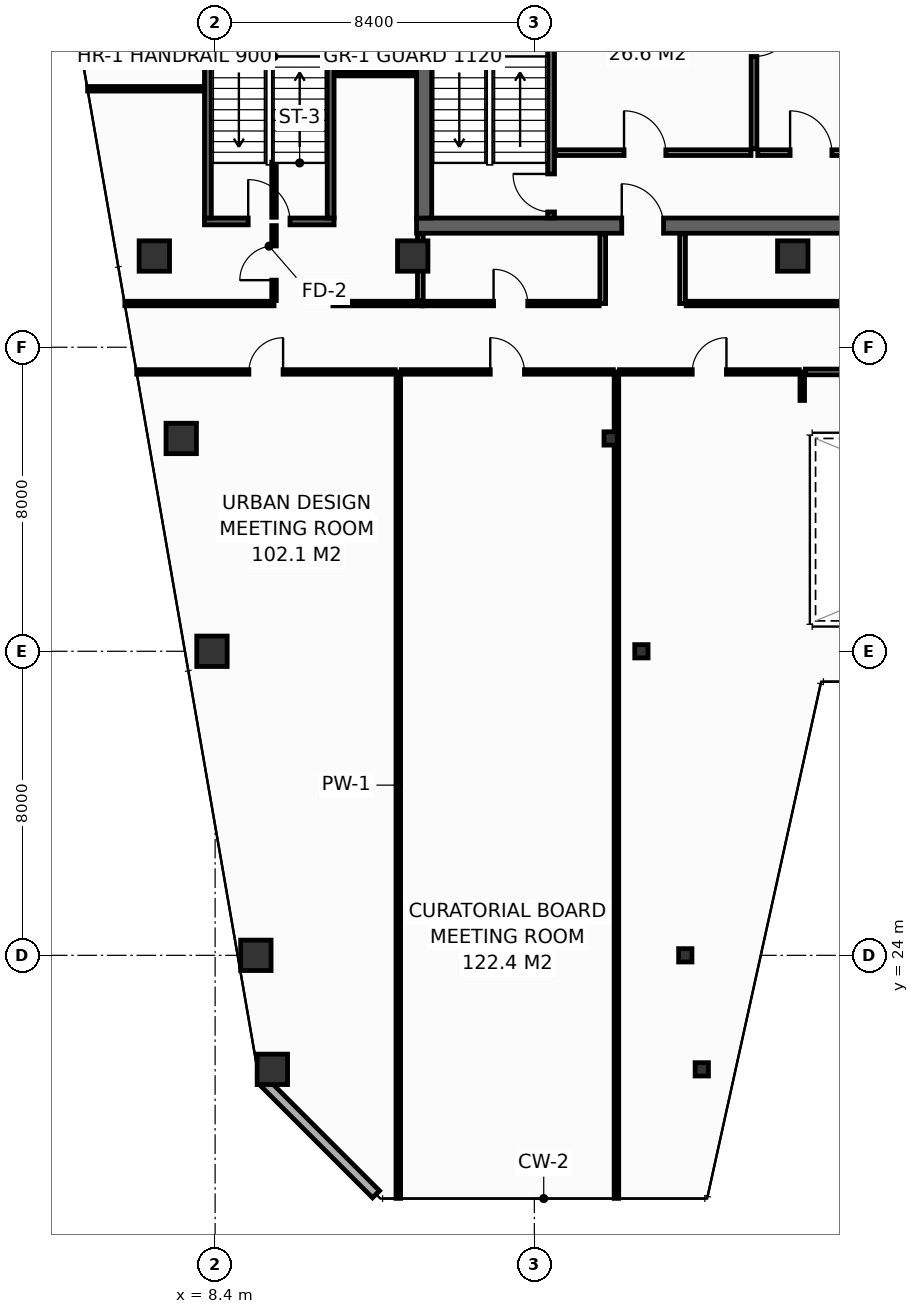
"""IFC4 building model, lengths in metres.
Left out: names, types, materials, properties, quantities, classifications, styles, units other than length and angle.
Written with IfcOpenShell. Run it as: python <this file> out.ifc"""

import sys

from ifc_helpers import new_model, si_unit, direction, frame, frame_2d, origin, origin_2d, place, context, subcontext, project, spatial, rectangle, hollow_rectangle, extrude, element, fill, save


model = new_model("IFC4")
c1 = context("Model", 3, precision=1e-05, world=origin(), true_north=direction((0.0, 1.0)))
c2 = subcontext(c1, "Body", "Model", "MODEL_VIEW")
j1 = project(units=[si_unit("LENGTHUNIT", "METRE"), si_unit("PLANEANGLEUNIT", "RADIAN")], contexts=[c1])
p1 = place(None, origin())
s1 = spatial("IfcSite", under=j1, at=p1, CompositionType="ELEMENT")
p2 = place(p1, origin())
s2 = spatial("IfcBuilding", under=s1, at=p2, CompositionType="ELEMENT")
p3 = place(p2, frame((0.0, 0.0, 242.0)))
s3 = spatial("IfcBuildingStorey", under=s2, at=p3, CompositionType="ELEMENT", Elevation=242.0)
p4 = place(p3, frame((13.7, 43.2, 0.0), z_axis=(0.0, 0.0, 1.0), x_axis=(1.0, 0.0, 0.0)))
e1 = element("IfcWall", 1, at=p4, inside=s3, PredefinedType="SHEAR", context=c2, shape_type="SweptSolid", body=[
    extrude(rectangle(XDim=32.5, YDim=0.4, at=frame_2d((16.25, 0.0))), origin(), (0.0, 0.0, 1.0), 3.55),
])
p5 = place(p4, frame((5.4, 0.0, 0.0)))
e2 = element("IfcOpeningElement", 2, at=p5, cuts=e1, PredefinedType="OPENING", context=c2, shape_type="SweptSolid", body=[
    extrude(rectangle(XDim=1.1, YDim=2.15, at=frame_2d((0.55, 1.075))), frame((0.0, 0.21, 0.0), z_axis=(0.0, -1.0, 0.0), x_axis=(1.0, 0.0, 0.0)), (0.0, 0.0, 1.0), 0.42),
])
p6 = place(p4, frame((25.6, 0.0, 0.0)))
e3 = element("IfcOpeningElement", 3, at=p6, cuts=e1, PredefinedType="OPENING", context=c2, shape_type="SweptSolid", body=[
    extrude(rectangle(XDim=1.1, YDim=2.15, at=frame_2d((0.55, 1.075))), frame((0.0, 0.21, 0.0), z_axis=(0.0, -1.0, 0.0), x_axis=(1.0, 0.0, 0.0)), (0.0, 0.0, 1.0), 0.42),
])
p7 = place(p3, frame((13.9, 43.4, 0.0), z_axis=(0.0, 0.0, 1.0), x_axis=(0.0, 1.0, 0.0)))
e4 = element("IfcWall", 4, at=p7, inside=s3, PredefinedType="SHEAR", context=c2, shape_type="SweptSolid", body=[
    extrude(rectangle(XDim=10.4, YDim=0.4, at=frame_2d((5.2, 0.0))), origin(), (0.0, 0.0, 1.0), 3.55),
])
for number, where, z_axis, x_axis in (
    (5, (6.8, 42.4, 0.0), (0.0, 0.0, 1.0), (1.0, 0.0, 0.0)),
    (6, (13.6, 42.4, 0.0), (0.0, 0.0, 1.0), (1.0, 0.0, 0.0)),
    (7, (23.6, 42.4, 0.0), (0.0, 0.0, 1.0), (1.0, 0.0, 0.0)),
    (8, (9.906, 21.0, 0.0), (0.0, 0.0, 1.0), (1.0, 0.0, 0.0)),
):
    element("IfcColumn", number, at=place(p3, frame(where, z_axis=z_axis, x_axis=x_axis)), inside=s3, PredefinedType="COLUMN", context=c2, shape_type="SweptSolid", body=[
        extrude(hollow_rectangle(XDim=0.8, YDim=0.8, WallThickness=0.036, at=origin_2d()), origin(), (0.0, 0.0, 1.0), 3.8),
    ])
p8 = place(p3, frame((21.206, 21.0, 0.0), z_axis=(0.0, 0.0, 1.0), x_axis=(1.0, 0.0, 0.0)))
e9 = element("IfcColumn", 9, at=p8, inside=s3, PredefinedType="COLUMN", context=c2, shape_type="SweptSolid", body=[
    extrude(hollow_rectangle(XDim=0.35, YDim=0.35, WallThickness=0.016, at=origin_2d()), origin(), (0.0, 0.0, 1.0), 3.8),
])
p9 = place(p3, frame((9.472, 24.0, 0.0), z_axis=(0.0, 0.0, 1.0), x_axis=(1.0, 0.0, 0.0)))
e10 = element("IfcColumn", 10, at=p9, inside=s3, PredefinedType="COLUMN", context=c2, shape_type="SweptSolid", body=[
    extrude(hollow_rectangle(XDim=0.8, YDim=0.8, WallThickness=0.036, at=origin_2d()), origin(), (0.0, 0.0, 1.0), 3.8),
])
p10 = place(p3, frame((20.772, 24.0, 0.0), z_axis=(0.0, 0.0, 1.0), x_axis=(1.0, 0.0, 0.0)))
e11 = element("IfcColumn", 11, at=p10, inside=s3, PredefinedType="COLUMN", context=c2, shape_type="SweptSolid", body=[
    extrude(hollow_rectangle(XDim=0.35, YDim=0.35, WallThickness=0.016, at=origin_2d()), origin(), (0.0, 0.0, 1.0), 3.8),
])
p11 = place(p3, frame((8.317, 32.0, 0.0), z_axis=(0.0, 0.0, 1.0), x_axis=(1.0, 0.0, 0.0)))
e12 = element("IfcColumn", 12, at=p11, inside=s3, PredefinedType="COLUMN", context=c2, shape_type="SweptSolid", body=[
    extrude(hollow_rectangle(XDim=0.8, YDim=0.8, WallThickness=0.036, at=origin_2d()), origin(), (0.0, 0.0, 1.0), 3.8),
])
p12 = place(p3, frame((19.617, 32.0, 0.0), z_axis=(0.0, 0.0, 1.0), x_axis=(1.0, 0.0, 0.0)))
e13 = element("IfcColumn", 13, at=p12, inside=s3, PredefinedType="COLUMN", context=c2, shape_type="SweptSolid", body=[
    extrude(hollow_rectangle(XDim=0.35, YDim=0.35, WallThickness=0.016, at=origin_2d()), origin(), (0.0, 0.0, 1.0), 3.8),
])
p13 = place(p3, frame((7.508, 37.6, 0.0), z_axis=(0.0, 0.0, 1.0), x_axis=(1.0, 0.0, 0.0)))
e14 = element("IfcColumn", 14, at=p13, inside=s3, PredefinedType="COLUMN", context=c2, shape_type="SweptSolid", body=[
    extrude(hollow_rectangle(XDim=0.8, YDim=0.8, WallThickness=0.036, at=origin_2d()), origin(), (0.0, 0.0, 1.0), 3.8),
])
p14 = place(p3, frame((18.808, 37.6, 0.0), z_axis=(0.0, 0.0, 1.0), x_axis=(1.0, 0.0, 0.0)))
e15 = element("IfcColumn", 15, at=p14, inside=s3, PredefinedType="COLUMN", context=c2, shape_type="SweptSolid", body=[
    extrude(hollow_rectangle(XDim=0.35, YDim=0.35, WallThickness=0.016, at=origin_2d()), origin(), (0.0, 0.0, 1.0), 3.8),
])
p15 = place(p3, frame((17.24, 43.4, 0.0), z_axis=(0.0, 0.0, 1.0), x_axis=(0.0, 1.0, 0.0)))
e16 = element("IfcWall", 16, at=p15, inside=s3, PredefinedType="SHEAR", context=c2, shape_type="SweptSolid", body=[
    extrude(rectangle(XDim=10.4, YDim=0.18, at=frame_2d((5.2, 0.0))), origin(), (0.0, 0.0, 1.0), 3.55),
])
p16 = place(p15, frame((0.16, 0.0, 0.0)))
e17 = element("IfcOpeningElement", 17, at=p16, cuts=e16, PredefinedType="OPENING", context=c2, shape_type="SweptSolid", body=[
    extrude(rectangle(XDim=1.0, YDim=2.15, at=frame_2d((0.5, 1.075))), frame((0.0, 0.1, 0.0), z_axis=(0.0, -1.0, 0.0), x_axis=(1.0, 0.0, 0.0)), (0.0, 0.0, 1.0), 0.2),
])
p17 = place(p3, frame((8.12, 43.31, 0.0), z_axis=(0.0, 0.0, 1.0), x_axis=(1.0, 0.0, 0.0)))
e18 = element("IfcWall", 18, at=p17, inside=s3, PredefinedType="SHEAR", context=c2, shape_type="SweptSolid", body=[
    extrude(rectangle(XDim=3.41, YDim=0.18, at=frame_2d((1.705, 0.0))), origin(), (0.0, 0.0, 1.0), 3.55),
])
p18 = place(p17, frame((1.15, 0.0, 0.0)))
e19 = element("IfcOpeningElement", 19, at=p18, cuts=e18, PredefinedType="OPENING", context=c2, shape_type="SweptSolid", body=[
    extrude(rectangle(XDim=1.1, YDim=2.15, at=frame_2d((0.55, 1.075))), frame((0.0, 0.1, 0.0), z_axis=(0.0, -1.0, 0.0), x_axis=(1.0, 0.0, 0.0)), (0.0, 0.0, 1.0), 0.2),
])
for number, where, z_axis, x_axis in (
    (20, (11.44, 43.4, 0.0), (0.0, 0.0, 1.0), (0.0, 1.0, 0.0)),
    (21, (8.21, 53.8, 0.0), (0.0, 0.0, 1.0), (0.0, -1.0, 0.0)),
):
    element("IfcWall", number, at=place(p3, frame(where, z_axis=z_axis, x_axis=x_axis)), inside=s3, PredefinedType="SHEAR", context=c2, shape_type="SweptSolid", body=[
        extrude(rectangle(XDim=10.4, YDim=0.18, at=frame_2d((5.2, 0.0))), origin(), (0.0, 0.0, 1.0), 3.55),
    ])
p19 = place(p3, frame((17.36, 45.12, 0.0), z_axis=(0.0, 0.0, 1.0), x_axis=(1.0, 0.0, 0.0)))
e22 = element("IfcWall", 22, at=p19, inside=s3, PredefinedType="PARTITIONING", context=c2, shape_type="SweptSolid", body=[
    extrude(rectangle(XDim=5.14, YDim=0.15, at=frame_2d((2.57, 0.0))), origin(), (0.0, 0.0, 1.0), 3.55),
])
p20 = place(p19, frame((1.8, 0.0, 0.0)))
e23 = element("IfcOpeningElement", 23, at=p20, cuts=e22, PredefinedType="OPENING", context=c2, shape_type="SweptSolid", body=[
    extrude(rectangle(XDim=1.1, YDim=2.15, at=frame_2d((0.55, 1.075))), frame((0.0, 0.085, 0.0), z_axis=(0.0, -1.0, 0.0), x_axis=(1.0, 0.0, 0.0)), (0.0, 0.0, 1.0), 0.17),
])
p21 = place(p3, frame((22.58, 50.55, 0.0), z_axis=(0.0, 0.0, 1.0), x_axis=(0.0, -1.0, 0.0)))
e24 = element("IfcWall", 24, at=p21, inside=s3, PredefinedType="PARTITIONING", context=c2, shape_type="SweptSolid", body=[
    extrude(rectangle(XDim=5.33, YDim=0.15, at=frame_2d((2.665, 0.0))), origin(), (0.0, 0.0, 1.0), 3.55),
])
p22 = place(p21, frame((1.8, 0.0, 0.0)))
e25 = element("IfcOpeningElement", 25, at=p22, cuts=e24, PredefinedType="OPENING", context=c2, shape_type="SweptSolid", body=[
    extrude(rectangle(XDim=1.1, YDim=2.15, at=frame_2d((0.55, 1.075))), frame((0.0, 0.085, 0.0), z_axis=(0.0, -1.0, 0.0), x_axis=(1.0, 0.0, 0.0)), (0.0, 0.0, 1.0), 0.17),
])
p23 = place(p3, frame((22.68, 45.12, 0.0), z_axis=(0.0, 0.0, 1.0), x_axis=(1.0, 0.0, 0.0)))
e26 = element("IfcWall", 26, at=p23, inside=s3, PredefinedType="PARTITIONING", context=c2, shape_type="SweptSolid", body=[
    extrude(rectangle(XDim=2.92, YDim=0.15, at=frame_2d((1.46, 0.0))), origin(), (0.0, 0.0, 1.0), 3.55),
])
p24 = place(p23, frame((0.85, 0.0, 0.0)))
e27 = element("IfcOpeningElement", 27, at=p24, cuts=e26, PredefinedType="OPENING", context=c2, shape_type="SweptSolid", body=[
    extrude(rectangle(XDim=1.1, YDim=2.15, at=frame_2d((0.55, 1.075))), frame((0.0, 0.085, 0.0), z_axis=(0.0, -1.0, 0.0), x_axis=(1.0, 0.0, 0.0)), (0.0, 0.0, 1.0), 0.17),
])
p25 = place(p3, frame((9.66, 20.687, 0.0), z_axis=(0.0, 0.0, 1.0), x_axis=(0.70707775441, -0.707135806771, 0.0)))
e28 = element("IfcWall", 28, at=p25, inside=s3, PredefinedType="STANDARD", context=c2, shape_type="SweptSolid", body=[
    extrude(rectangle(XDim=4.206, YDim=0.26, at=frame_2d((2.103, 0.0))), origin(), (0.0, 0.0, 1.0), 3.55),
])
p26 = place(p3, frame((6.024, 41.15, 0.0), z_axis=(0.0, 0.0, 1.0), x_axis=(1.0, 0.0, 0.0)))
e29 = element("IfcWall", 29, at=p26, inside=s3, PredefinedType="PARTITIONING", context=c2, shape_type="SweptSolid", body=[
    extrude(rectangle(XDim=3.926, YDim=0.12, at=frame_2d((1.963, 0.0))), origin(), (0.0, 0.0, 1.0), 3.085),
])
p27 = place(p3, frame((11.5, 41.15, 0.0), z_axis=(0.0, 0.0, 1.0), x_axis=(1.0, 0.0, 0.0)))
e30 = element("IfcWall", 30, at=p27, inside=s3, PredefinedType="PARTITIONING", context=c2, shape_type="SweptSolid", body=[
    extrude(rectangle(XDim=2.35, YDim=0.12, at=frame_2d((1.175, 0.0))), origin(), (0.0, 0.0, 1.0), 3.55),
])
p28 = place(p3, frame((5.045, 46.8, 0.0), z_axis=(0.0, 0.0, 1.0), x_axis=(1.0, 0.0, 0.0)))
e31 = element("IfcWall", 31, at=p28, inside=s3, PredefinedType="PARTITIONING", context=c2, shape_type="SweptSolid", body=[
    extrude(rectangle(XDim=3.055, YDim=0.12, at=frame_2d((1.527, 0.0))), origin(), (0.0, 0.0, 1.0), 2.947),
])
p29 = place(p3, frame((9.95, 41.23, 0.0), z_axis=(0.0, 0.0, 1.0), x_axis=(0.0, 1.0, 0.0)))
e32 = element("IfcWall", 32, at=p29, inside=s3, PredefinedType="PARTITIONING", context=c2, shape_type="SweptSolid", body=[
    extrude(rectangle(XDim=1.97, YDim=0.12, at=frame_2d((0.985, 0.0))), origin(), (0.0, 0.0, 1.0), 2.947),
])
p30 = place(p29, frame((0.535, 0.0, 0.0)))
e33 = element("IfcOpeningElement", 33, at=p30, cuts=e32, PredefinedType="OPENING", context=c2, shape_type="SweptSolid", body=[
    extrude(rectangle(XDim=0.9, YDim=2.1, at=frame_2d((0.45, 1.05))), frame((0.0, 0.07, 0.0), z_axis=(0.0, -1.0, 0.0), x_axis=(1.0, 0.0, 0.0)), (0.0, 0.0, 1.0), 0.14),
])
p31 = place(p3, frame((9.95, 43.42, 0.0), z_axis=(0.0, 0.0, 1.0), x_axis=(0.0, 1.0, 0.0)))
e34 = element("IfcWall", 34, at=p31, inside=s3, PredefinedType="PARTITIONING", context=c2, shape_type="SweptSolid", body=[
    extrude(rectangle(XDim=1.45, YDim=0.12, at=frame_2d((0.725, 0.0))), origin(), (0.0, 0.0, 1.0), 3.55),
])
p32 = place(p3, frame((11.55, 47.2, 0.0), z_axis=(0.0, 0.0, 1.0), x_axis=(1.0, 0.0, 0.0)))
e35 = element("IfcWall", 35, at=p32, inside=s3, PredefinedType="PARTITIONING", context=c2, shape_type="SweptSolid", body=[
    extrude(rectangle(XDim=2.13, YDim=0.12, at=frame_2d((1.065, 0.0))), origin(), (0.0, 0.0, 1.0), 3.55),
])
p33 = place(p3, frame((13.8, 41.23, 0.0), z_axis=(0.0, 0.0, 1.0), x_axis=(0.0, 1.0, 0.0)))
e36 = element("IfcWall", 36, at=p33, inside=s3, PredefinedType="PARTITIONING", context=c2, shape_type="SweptSolid", body=[
    extrude(rectangle(XDim=1.75, YDim=0.15, at=frame_2d((0.875, 0.0))), origin(), (0.0, 0.0, 1.0), 3.55),
])
for number, where, z_axis, x_axis in (
    (37, (18.6, 41.15, 0.0), (0.0, 0.0, 1.0), (0.0, 1.0, 0.0)),
    (38, (20.7, 41.15, 0.0), (0.0, 0.0, 1.0), (0.0, 1.0, 0.0)),
):
    element("IfcWall", number, at=place(p3, frame(where, z_axis=z_axis, x_axis=x_axis)), inside=s3, PredefinedType="PARTITIONING", context=c2, shape_type="SweptSolid", body=[
        extrude(rectangle(XDim=1.83, YDim=0.15, at=frame_2d((0.915, 0.0))), origin(), (0.0, 0.0, 1.0), 3.55),
    ])
p34 = place(p3, frame((13.85, 41.15, 0.0), z_axis=(0.0, 0.0, 1.0), x_axis=(1.0, 0.0, 0.0)))
e39 = element("IfcWall", 39, at=p34, inside=s3, PredefinedType="PARTITIONING", context=c2, shape_type="SweptSolid", body=[
    extrude(rectangle(XDim=4.655, YDim=0.12, at=frame_2d((2.327, 0.0))), origin(), (0.0, 0.0, 1.0), 3.55),
])
p35 = place(p34, frame((1.877, 0.0, 0.0)))
e40 = element("IfcOpeningElement", 40, at=p35, cuts=e39, PredefinedType="OPENING", context=c2, shape_type="SweptSolid", body=[
    extrude(rectangle(XDim=0.9, YDim=2.1, at=frame_2d((0.45, 1.05))), frame((0.0, 0.07, 0.0), z_axis=(0.0, -1.0, 0.0), x_axis=(1.0, 0.0, 0.0)), (0.0, 0.0, 1.0), 0.14),
])
p36 = place(p3, frame((20.795, 41.15, 0.0), z_axis=(0.0, 0.0, 1.0), x_axis=(1.0, 0.0, 0.0)))
e41 = element("IfcWall", 41, at=p36, inside=s3, PredefinedType="PARTITIONING", context=c2, shape_type="SweptSolid", body=[
    extrude(rectangle(XDim=17.91, YDim=0.12, at=frame_2d((8.955, 0.0))), origin(), (0.0, 0.0, 1.0), 2.947),
])
p37 = place(p36, frame((8.505, 0.0, 0.0)))
e42 = element("IfcOpeningElement", 42, at=p37, cuts=e41, PredefinedType="OPENING", context=c2, shape_type="SweptSolid", body=[
    extrude(rectangle(XDim=0.9, YDim=2.1, at=frame_2d((0.45, 1.05))), frame((0.0, 0.07, 0.0), z_axis=(0.0, -1.0, 0.0), x_axis=(1.0, 0.0, 0.0)), (0.0, 0.0, 1.0), 0.14),
])
for number, where, z_axis, x_axis in (
    (43, (13.22, 17.605, 0.0), (0.0, 0.0, 1.0), (0.0, 1.0, 0.0)),
    (44, (18.96, 17.605, 0.0), (0.0, 0.0, 1.0), (0.0, 1.0, 0.0)),
):
    element("IfcWall", number, at=place(p3, frame(where, z_axis=z_axis, x_axis=x_axis)), inside=s3, PredefinedType="PARTITIONING", context=c2, shape_type="SweptSolid", body=[
        extrude(rectangle(XDim=21.745, YDim=0.12, at=frame_2d((10.873, 0.0))), origin(), (0.0, 0.0, 1.0), 2.947),
    ])
p38 = place(p3, frame((23.85, 38.6, 0.0), z_axis=(0.0, 0.0, 1.0), x_axis=(0.0, 1.0, 0.0)))
e45 = element("IfcWall", 45, at=p38, inside=s3, PredefinedType="PARTITIONING", context=c2, shape_type="SweptSolid", body=[
    extrude(rectangle(XDim=0.75, YDim=0.12, at=frame_2d((0.375, 0.0))), origin(), (0.0, 0.0, 1.0), 3.55),
])
p39 = place(p3, frame((6.336, 39.35, 0.0), z_axis=(0.0, 0.0, 1.0), x_axis=(1.0, 0.0, 0.0)))
e46 = element("IfcWall", 46, at=p39, inside=s3, PredefinedType="PARTITIONING", context=c2, shape_type="SweptSolid", body=[
    extrude(rectangle(XDim=6.803, YDim=0.12, at=frame_2d((3.402, 0.0))), origin(), (0.0, 0.0, 1.0), 3.085),
])
p40 = place(p39, frame((2.952, 0.0, 0.0)))
e47 = element("IfcOpeningElement", 47, at=p40, cuts=e46, PredefinedType="OPENING", context=c2, shape_type="SweptSolid", body=[
    extrude(rectangle(XDim=0.9, YDim=2.1, at=frame_2d((0.45, 1.05))), frame((0.0, 0.07, 0.0), z_axis=(0.0, -1.0, 0.0), x_axis=(1.0, 0.0, 0.0)), (0.0, 0.0, 1.0), 0.14),
])
p41 = place(p3, frame((13.3, 39.35, 0.0), z_axis=(0.0, 0.0, 1.0), x_axis=(1.0, 0.0, 0.0)))
e48 = element("IfcWall", 48, at=p41, inside=s3, PredefinedType="PARTITIONING", context=c2, shape_type="SweptSolid", body=[
    extrude(rectangle(XDim=5.58, YDim=0.12, at=frame_2d((2.79, 0.0))), origin(), (0.0, 0.0, 1.0), 3.55),
])
p42 = place(p41, frame((2.34, 0.0, 0.0)))
e49 = element("IfcOpeningElement", 49, at=p42, cuts=e48, PredefinedType="OPENING", context=c2, shape_type="SweptSolid", body=[
    extrude(rectangle(XDim=0.9, YDim=2.1, at=frame_2d((0.45, 1.05))), frame((0.0, 0.07, 0.0), z_axis=(0.0, -1.0, 0.0), x_axis=(1.0, 0.0, 0.0)), (0.0, 0.0, 1.0), 0.14),
])
p43 = place(p3, frame((19.04, 39.35, 0.0), z_axis=(0.0, 0.0, 1.0), x_axis=(1.0, 0.0, 0.0)))
e50 = element("IfcWall", 50, at=p43, inside=s3, PredefinedType="PARTITIONING", context=c2, shape_type="SweptSolid", body=[
    extrude(rectangle(XDim=4.73, YDim=0.12, at=frame_2d((2.365, 0.0))), origin(), (0.0, 0.0, 1.0), 2.947),
])
p44 = place(p43, frame((1.915, 0.0, 0.0)))
e51 = element("IfcOpeningElement", 51, at=p44, cuts=e50, PredefinedType="OPENING", context=c2, shape_type="SweptSolid", body=[
    extrude(rectangle(XDim=0.9, YDim=2.1, at=frame_2d((0.45, 1.05))), frame((0.0, 0.07, 0.0), z_axis=(0.0, -1.0, 0.0), x_axis=(1.0, 0.0, 0.0)), (0.0, 0.0, 1.0), 0.14),
])
p45 = place(p3, frame((23.93, 39.35, 0.0), z_axis=(0.0, 0.0, 1.0), x_axis=(1.0, 0.0, 0.0)))
e52 = element("IfcWall", 52, at=p45, inside=s3, PredefinedType="PARTITIONING", context=c2, shape_type="SweptSolid", body=[
    extrude(rectangle(XDim=12.14, YDim=0.15, at=frame_2d((6.07, 0.0))), origin(), (0.0, 0.0, 1.0), 3.55),
])
p46 = place(p16, origin())
e53 = element("IfcDoor", 53, at=p46, inside=s3, OperationType="SINGLE_SWING_RIGHT", PredefinedType="DOOR", context=c2, shape_type="SweptSolid", body=[
    extrude(rectangle(XDim=1.0, YDim=2.15, at=frame_2d((0.5, 1.075))), frame((0.0, 0.025, 0.0), z_axis=(0.0, -1.0, 0.0), x_axis=(1.0, 0.0, 0.0)), (0.0, 0.0, 1.0), 0.05),
])
fill(e17, e53)
p47 = place(p18, origin())
e54 = element("IfcDoor", 54, at=p47, inside=s3, OperationType="SINGLE_SWING_LEFT", PredefinedType="DOOR", context=c2, shape_type="SweptSolid", body=[
    extrude(rectangle(XDim=1.1, YDim=2.15, at=frame_2d((0.55, 1.075))), frame((0.0, 0.025, 0.0), z_axis=(0.0, -1.0, 0.0), x_axis=(1.0, 0.0, 0.0)), (0.0, 0.0, 1.0), 0.05),
])
fill(e19, e54)
p48 = place(p20, origin())
e55 = element("IfcDoor", 55, at=p48, inside=s3, OperationType="SINGLE_SWING_LEFT", PredefinedType="DOOR", context=c2, shape_type="SweptSolid", body=[
    extrude(rectangle(XDim=1.1, YDim=2.15, at=frame_2d((0.55, 1.075))), frame((0.0, 0.025, 0.0), z_axis=(0.0, -1.0, 0.0), x_axis=(1.0, 0.0, 0.0)), (0.0, 0.0, 1.0), 0.05),
])
fill(e23, e55)
p49 = place(p22, origin())
e56 = element("IfcDoor", 56, at=p49, inside=s3, OperationType="SINGLE_SWING_LEFT", PredefinedType="DOOR", context=c2, shape_type="SweptSolid", body=[
    extrude(rectangle(XDim=1.1, YDim=2.15, at=frame_2d((0.55, 1.075))), frame((0.0, 0.025, 0.0), z_axis=(0.0, -1.0, 0.0), x_axis=(1.0, 0.0, 0.0)), (0.0, 0.0, 1.0), 0.05),
])
fill(e25, e56)
p50 = place(p24, origin())
e57 = element("IfcDoor", 57, at=p50, inside=s3, OperationType="SINGLE_SWING_LEFT", PredefinedType="DOOR", context=c2, shape_type="SweptSolid", body=[
    extrude(rectangle(XDim=1.1, YDim=2.15, at=frame_2d((0.55, 1.075))), frame((0.0, 0.025, 0.0), z_axis=(0.0, -1.0, 0.0), x_axis=(1.0, 0.0, 0.0)), (0.0, 0.0, 1.0), 0.05),
])
fill(e27, e57)
p51 = place(p5, origin())
e58 = element("IfcDoor", 58, at=p51, inside=s3, OperationType="SINGLE_SWING_LEFT", PredefinedType="DOOR", context=c2, shape_type="SweptSolid", body=[
    extrude(rectangle(XDim=1.1, YDim=2.15, at=frame_2d((0.55, 1.075))), frame((0.0, 0.025, 0.0), z_axis=(0.0, -1.0, 0.0), x_axis=(1.0, 0.0, 0.0)), (0.0, 0.0, 1.0), 0.05),
])
fill(e2, e58)
p52 = place(p30, origin())
e59 = element("IfcDoor", 59, at=p52, inside=s3, OperationType="SINGLE_SWING_LEFT", PredefinedType="DOOR", context=c2, shape_type="SweptSolid", body=[
    extrude(rectangle(XDim=0.9, YDim=2.1, at=frame_2d((0.45, 1.05))), frame((0.0, 0.025, 0.0), z_axis=(0.0, -1.0, 0.0), x_axis=(1.0, 0.0, 0.0)), (0.0, 0.0, 1.0), 0.05),
])
fill(e33, e59)
p53 = place(p35, origin())
e60 = element("IfcDoor", 60, at=p53, inside=s3, OperationType="SINGLE_SWING_LEFT", PredefinedType="DOOR", context=c2, shape_type="SweptSolid", body=[
    extrude(rectangle(XDim=0.9, YDim=2.1, at=frame_2d((0.45, 1.05))), frame((0.0, 0.025, 0.0), z_axis=(0.0, -1.0, 0.0), x_axis=(1.0, 0.0, 0.0)), (0.0, 0.0, 1.0), 0.05),
])
fill(e40, e60)
p54 = place(p40, origin())
e61 = element("IfcDoor", 61, at=p54, inside=s3, OperationType="SINGLE_SWING_RIGHT", PredefinedType="DOOR", context=c2, shape_type="SweptSolid", body=[
    extrude(rectangle(XDim=0.9, YDim=2.1, at=frame_2d((0.45, 1.05))), frame((0.0, 0.025, 0.0), z_axis=(0.0, -1.0, 0.0), x_axis=(1.0, 0.0, 0.0)), (0.0, 0.0, 1.0), 0.05),
])
fill(e47, e61)
p55 = place(p42, origin())
e62 = element("IfcDoor", 62, at=p55, inside=s3, OperationType="SINGLE_SWING_LEFT", PredefinedType="DOOR", context=c2, shape_type="SweptSolid", body=[
    extrude(rectangle(XDim=0.9, YDim=2.1, at=frame_2d((0.45, 1.05))), frame((0.0, 0.025, 0.0), z_axis=(0.0, -1.0, 0.0), x_axis=(1.0, 0.0, 0.0)), (0.0, 0.0, 1.0), 0.05),
])
fill(e49, e62)
p56 = place(p44, origin())
e63 = element("IfcDoor", 63, at=p56, inside=s3, OperationType="SINGLE_SWING_RIGHT", PredefinedType="DOOR", context=c2, shape_type="SweptSolid", body=[
    extrude(rectangle(XDim=0.9, YDim=2.1, at=frame_2d((0.45, 1.05))), frame((0.0, 0.025, 0.0), z_axis=(0.0, -1.0, 0.0), x_axis=(1.0, 0.0, 0.0)), (0.0, 0.0, 1.0), 0.05),
])
fill(e51, e63)
save(model, sys.argv[1])
